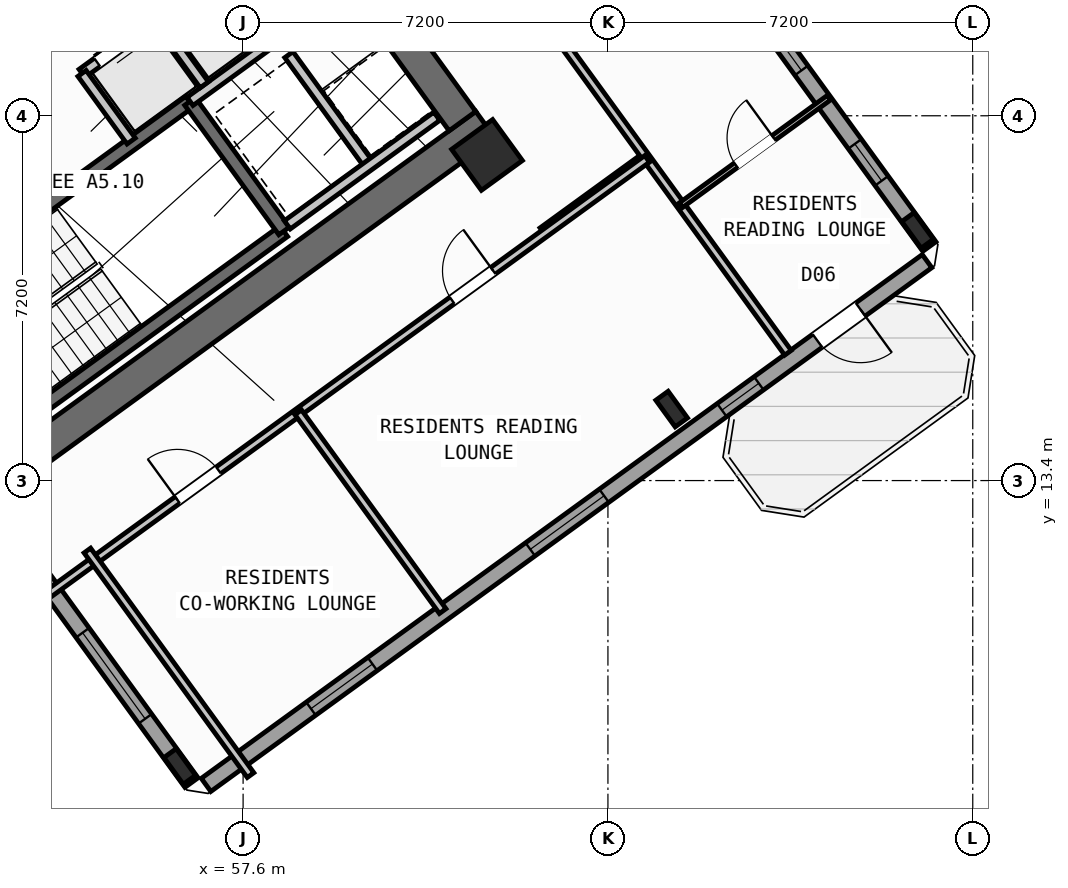
"""IFC4 building model, lengths in metres.
Left out: names, types, materials, properties, quantities, classifications, styles, units other than length and angle.
Written with IfcOpenShell. Run it as: python <this file> out.ifc"""

import sys

from ifc_helpers import new_model, si_unit, direction, frame, frame_2d, origin, origin_2d, place, context, subcontext, project, spatial, rectangle, hollow_rectangle, i_section, extrude, source, transform, mapped, element, fill, save


model = new_model("IFC4")
c1 = context("Model", 3, precision=1e-05, world=origin(), true_north=direction((0.0, 1.0)))
c2 = subcontext(c1, "Body", "Model", "MODEL_VIEW")
j1 = project(units=[si_unit("LENGTHUNIT", "METRE"), si_unit("PLANEANGLEUNIT", "RADIAN")], contexts=[c1])
p1 = place(None, origin())
s1 = spatial("IfcSite", under=j1, at=p1, CompositionType="ELEMENT")
p2 = place(p1, origin())
s2 = spatial("IfcBuilding", under=s1, at=p2, CompositionType="ELEMENT")
p3 = place(p2, frame((0.0, 0.0, 56.4)))
s3 = spatial("IfcBuildingStorey", under=s2, at=p3, CompositionType="ELEMENT", Elevation=56.4)
p4 = place(p3, frame((52.318, 13.11, 0.0), z_axis=(0.0, 0.0, 1.0), x_axis=(0.809019445368, 0.587781878776, 0.0)))
e1 = element("IfcWall", 1, at=p4, inside=s3, PredefinedType="SHEAR", context=c2, shape_type="SweptSolid", body=[
    extrude(rectangle(XDim=12.44, YDim=0.65, at=frame_2d((6.22, 0.0))), origin(), (0.0, 0.0, 1.0), 3.35),
])
p5 = place(p3, frame((61.929, 20.494, 0.0), z_axis=(0.0, 0.0, 1.0), x_axis=(-0.58782982593, 0.808984607855, 0.0)))
e2 = element("IfcWall", 2, at=p5, inside=s3, PredefinedType="SHEAR", context=c2, shape_type="SweptSolid", body=[
    extrude(rectangle(XDim=3.525, YDim=0.65, at=frame_2d((1.762, 0.0))), origin(), (0.0, 0.0, 1.0), 3.35),
])
m1 = source(origin(), c2, "Body", "SweptSolid", [
    extrude(i_section(OverallWidth=0.3, OverallDepth=0.65, WebThickness=0.016, FlangeThickness=0.031, at=origin_2d()), origin(), (0.0, 0.0, 1.0), 3.6),
])
for number, where, z_axis, x_axis in (
    (3, (56.35, 7.758, 0.0), (0.0, 0.0, 1.0), (0.809, 0.588, 0.0)),
    (4, (66.058, 14.811, 0.0), (0.0, 0.0, 1.0), (0.809, 0.588, 0.0)),
):
    element("IfcColumn", number, at=place(p3, frame(where, z_axis=z_axis, x_axis=x_axis)), inside=s3, PredefinedType="COLUMN", context=c2, shape_type="MappedRepresentation", body=[
        mapped(m1, transform((0.0, 0.0, 0.0), scale=1.0)),
    ])
m2 = source(origin(), c2, "Body", "SweptSolid", [
    extrude(hollow_rectangle(XDim=1.0, YDim=1.0, WallThickness=0.04, at=origin_2d()), origin(), (0.0, 0.0, 1.0), 3.6),
])
p6 = place(p3, frame((62.414, 19.827, 0.0), z_axis=(0.0, 0.0, 1.0), x_axis=(0.809016994375, 0.587785252292, 0.0)))
e5 = element("IfcColumn", 5, at=p6, inside=s3, PredefinedType="COLUMN", context=c2, shape_type="MappedRepresentation", body=[
    mapped(m2, transform((0.0, 0.0, 0.0), scale=1.0)),
])
p7 = place(p3, frame((70.912, 18.338, 0.0), z_axis=(0.0, 0.0, 1.0), x_axis=(0.809016994375, 0.587785252292, 0.0)))
e6 = element("IfcColumn", 6, at=p7, inside=s3, PredefinedType="COLUMN", context=c2, shape_type="MappedRepresentation", body=[
    mapped(m1, transform((0.0, 0.0, 0.0), scale=1.0)),
])
p8 = place(p3, frame((58.455, 35.484, 0.0), z_axis=(0.0, 0.0, 1.0), x_axis=(0.587783625747, -0.809018176127, 0.0)))
e7 = element("IfcWall", 7, at=p8, inside=s3, PredefinedType="STANDARD", context=c2, shape_type="SweptSolid", body=[
    extrude(rectangle(XDim=21.587, YDim=0.32, at=frame_2d((10.794, 0.0))), origin(), (0.0, 0.0, 1.0), 2.725),
])
p9 = place(p8, frame((1.54, 0.0, 0.85)))
e8 = element("IfcOpeningElement", 8, at=p9, cuts=e7, PredefinedType="OPENING", context=c2, shape_type="SweptSolid", body=[
    extrude(rectangle(XDim=1.5, YDim=1.5, at=frame_2d((0.75, 0.75))), frame((0.0, 0.17, 0.0), z_axis=(0.0, -1.0, 0.0), x_axis=(1.0, 0.0, 0.0)), (0.0, 0.0, 1.0), 0.34),
])
p10 = place(p8, frame((4.695, 0.0, 0.85)))
e9 = element("IfcOpeningElement", 9, at=p10, cuts=e7, PredefinedType="OPENING", context=c2, shape_type="SweptSolid", body=[
    extrude(rectangle(XDim=1.8, YDim=1.5, at=frame_2d((0.9, 0.75))), frame((0.0, 0.17, 0.0), z_axis=(0.0, -1.0, 0.0), x_axis=(1.0, 0.0, 0.0)), (0.0, 0.0, 1.0), 0.34),
])
p11 = place(p8, frame((13.009, 0.0, 1.0)))
e10 = element("IfcOpeningElement", 10, at=p11, cuts=e7, PredefinedType="OPENING", context=c2, shape_type="SweptSolid", body=[
    extrude(rectangle(XDim=0.9, YDim=1.25, at=frame_2d((0.45, 0.625))), frame((0.0, 0.17, 0.0), z_axis=(0.0, -1.0, 0.0), x_axis=(1.0, 0.0, 0.0)), (0.0, 0.0, 1.0), 0.34),
])
p12 = place(p8, frame((16.092, 0.0, 0.95)))
e11 = element("IfcOpeningElement", 11, at=p12, cuts=e7, PredefinedType="OPENING", context=c2, shape_type="SweptSolid", body=[
    extrude(rectangle(XDim=1.2, YDim=1.4, at=frame_2d((0.6, 0.7))), frame((0.0, 0.17, 0.0), z_axis=(0.0, -1.0, 0.0), x_axis=(1.0, 0.0, 0.0)), (0.0, 0.0, 1.0), 0.34),
])
p13 = place(p8, frame((19.085, 0.0, 1.0)))
e12 = element("IfcOpeningElement", 12, at=p13, cuts=e7, PredefinedType="OPENING", context=c2, shape_type="SweptSolid", body=[
    extrude(rectangle(XDim=0.9, YDim=1.25, at=frame_2d((0.45, 0.625))), frame((0.0, 0.17, 0.0), z_axis=(0.0, -1.0, 0.0), x_axis=(1.0, 0.0, 0.0)), (0.0, 0.0, 1.0), 0.34),
])
p14 = place(p3, frame((71.098, 17.731, 0.0), z_axis=(0.0, 0.0, 1.0), x_axis=(-0.809021120468, -0.587779573171, 0.0)))
e13 = element("IfcWall", 13, at=p14, inside=s3, PredefinedType="STANDARD", context=c2, shape_type="SweptSolid", body=[
    extrude(rectangle(XDim=17.588, YDim=0.32, at=frame_2d((8.794, 0.0))), origin(), (0.0, 0.0, 1.0), 3.35),
])
p15 = place(p14, frame((1.624, 0.0, 0.0)))
e14 = element("IfcOpeningElement", 14, at=p15, cuts=e13, PredefinedType="OPENING", context=c2, shape_type="SweptSolid", body=[
    extrude(rectangle(XDim=1.05, YDim=2.15, at=frame_2d((0.525, 1.075))), frame((0.0, 0.17, 0.0), z_axis=(0.0, -1.0, 0.0), x_axis=(1.0, 0.0, 0.0)), (0.0, 0.0, 1.0), 0.34),
])
p16 = place(p14, frame((4.104, 0.0, 1.0)))
e15 = element("IfcOpeningElement", 15, at=p16, cuts=e13, PredefinedType="OPENING", context=c2, shape_type="SweptSolid", body=[
    extrude(rectangle(XDim=0.9, YDim=1.25, at=frame_2d((0.45, 0.625))), frame((0.0, 0.17, 0.0), z_axis=(0.0, -1.0, 0.0), x_axis=(1.0, 0.0, 0.0)), (0.0, 0.0, 1.0), 0.34),
])
p17 = place(p14, frame((7.879, 0.0, 0.85)))
e16 = element("IfcOpeningElement", 16, at=p17, cuts=e13, PredefinedType="OPENING", context=c2, shape_type="SweptSolid", body=[
    extrude(rectangle(XDim=1.8, YDim=1.5, at=frame_2d((0.9, 0.75))), frame((0.0, 0.17, 0.0), z_axis=(0.0, -1.0, 0.0), x_axis=(1.0, 0.0, 0.0)), (0.0, 0.0, 1.0), 0.34),
])
p18 = place(p14, frame((13.529, 0.0, 0.85)))
e17 = element("IfcOpeningElement", 17, at=p18, cuts=e13, PredefinedType="OPENING", context=c2, shape_type="SweptSolid", body=[
    extrude(rectangle(XDim=1.5, YDim=1.5, at=frame_2d((0.75, 0.75))), frame((0.0, 0.17, 0.0), z_axis=(0.0, -1.0, 0.0), x_axis=(1.0, 0.0, 0.0)), (0.0, 0.0, 1.0), 0.34),
])
p19 = place(p3, frame((56.581, 7.439, 0.0), z_axis=(0.0, 0.0, 1.0), x_axis=(-0.587785875463, 0.809016541614, 0.0)))
e18 = element("IfcWall", 18, at=p19, inside=s3, PredefinedType="STANDARD", context=c2, shape_type="SweptSolid", body=[
    extrude(rectangle(XDim=6.774, YDim=0.32, at=frame_2d((3.387, 0.0))), origin(), (0.0, 0.0, 1.0), 2.725),
])
p20 = place(p19, frame((1.556, 0.0, 0.8)))
e19 = element("IfcOpeningElement", 19, at=p20, cuts=e18, PredefinedType="OPENING", context=c2, shape_type="SweptSolid", body=[
    extrude(rectangle(XDim=2.1, YDim=1.55, at=frame_2d((1.05, 0.775))), frame((0.0, 0.17, 0.0), z_axis=(0.0, -1.0, 0.0), x_axis=(1.0, 0.0, 0.0)), (0.0, 0.0, 1.0), 0.34),
])
p21 = place(p3, frame((52.472, 14.013, 0.0), z_axis=(0.0, 0.0, 1.0), x_axis=(0.809028366311, 0.587769599847, 0.0)))
e20 = element("IfcWall", 20, at=p21, inside=s3, PredefinedType="SHEAR", context=c2, shape_type="SweptSolid", body=[
    extrude(rectangle(XDim=7.33, YDim=0.26, at=frame_2d((3.665, 0.0))), origin(), (0.0, 0.0, 1.0), 3.35),
])
p22 = place(p3, frame((50.615, 16.57, 0.0), z_axis=(0.0, 0.0, 1.0), x_axis=(0.809028366311, 0.587769599847, 0.0)))
e21 = element("IfcWall", 21, at=p22, inside=s3, PredefinedType="SHEAR", context=c2, shape_type="SweptSolid", body=[
    extrude(rectangle(XDim=7.33, YDim=0.26, at=frame_2d((3.665, 0.0))), origin(), (0.0, 0.0, 1.0), 3.35),
])
p23 = place(p22, frame((0.22, 0.0, 0.0)))
e22 = element("IfcOpeningElement", 22, at=p23, cuts=e21, PredefinedType="OPENING", context=c2, shape_type="SweptSolid", body=[
    extrude(rectangle(XDim=1.1, YDim=2.1, at=frame_2d((0.55, 1.05))), frame((0.0, 0.14, 0.0), z_axis=(0.0, -1.0, 0.0), x_axis=(1.0, 0.0, 0.0)), (0.0, 0.0, 1.0), 0.28),
])
p24 = place(p3, frame((58.41, 18.327, 0.0), z_axis=(0.0, 0.0, 1.0), x_axis=(-0.58776738483, 0.809029975545, 0.0)))
e23 = element("IfcWall", 23, at=p24, inside=s3, PredefinedType="SHEAR", context=c2, shape_type="SweptSolid", body=[
    extrude(rectangle(XDim=3.16, YDim=0.26, at=frame_2d((1.58, 0.0))), origin(), (0.0, 0.0, 1.0), 3.35),
])
p25 = place(p3, frame((56.553, 20.884, 0.0), z_axis=(0.0, 0.0, 1.0), x_axis=(0.809035789462, 0.587759382205, 0.0)))
e24 = element("IfcWall", 24, at=p25, inside=s3, PredefinedType="STANDARD", context=c2, shape_type="SweptSolid", body=[
    extrude(rectangle(XDim=3.768, YDim=0.2, at=frame_2d((1.884, 0.0))), origin(), (0.0, 0.0, 1.0), 3.34),
])
p26 = place(p25, frame((2.65, 0.0, 0.0)))
e25 = element("IfcOpeningElement", 25, at=p26, cuts=e24, PredefinedType="OPENING", context=c2, shape_type="SweptSolid", body=[
    extrude(rectangle(XDim=0.86, YDim=2.05, at=frame_2d((0.43, 1.025))), frame((0.0, 0.11, 0.0), z_axis=(0.0, -1.0, 0.0), x_axis=(1.0, 0.0, 0.0)), (0.0, 0.0, 1.0), 0.22),
])
p27 = place(p3, frame((54.421, 21.436, 0.0), z_axis=(0.0, 0.0, 1.0), x_axis=(0.809013710463, 0.587789772183, 0.0)))
e26 = element("IfcWall", 26, at=p27, inside=s3, PredefinedType="STANDARD", context=c2, shape_type="SweptSolid", body=[
    extrude(rectangle(XDim=5.36, YDim=0.2, at=frame_2d((2.68, 0.0))), origin(), (0.0, 0.0, 1.0), 3.34),
])
p28 = place(p27, frame((0.37, 0.0, 0.0)))
e27 = element("IfcOpeningElement", 27, at=p28, cuts=e26, PredefinedType="OPENING", context=c2, shape_type="SweptSolid", body=[
    extrude(rectangle(XDim=1.1, YDim=2.15, at=frame_2d((0.55, 1.075))), frame((0.0, 0.11, 0.0), z_axis=(0.0, -1.0, 0.0), x_axis=(1.0, 0.0, 0.0)), (0.0, 0.0, 1.0), 0.22),
])
p29 = place(p27, frame((2.17, 0.0, 0.0)))
e28 = element("IfcOpeningElement", 28, at=p29, cuts=e26, PredefinedType="OPENING", context=c2, shape_type="SweptSolid", body=[
    extrude(rectangle(XDim=1.1, YDim=2.15, at=frame_2d((0.55, 1.075))), frame((0.0, 0.11, 0.0), z_axis=(0.0, -1.0, 0.0), x_axis=(1.0, 0.0, 0.0)), (0.0, 0.0, 1.0), 0.22),
])
p30 = place(p27, frame((3.97, 0.0, 0.0)))
e29 = element("IfcOpeningElement", 29, at=p30, cuts=e26, PredefinedType="OPENING", context=c2, shape_type="SweptSolid", body=[
    extrude(rectangle(XDim=1.1, YDim=2.15, at=frame_2d((0.55, 1.075))), frame((0.0, 0.11, 0.0), z_axis=(0.0, -1.0, 0.0), x_axis=(1.0, 0.0, 0.0)), (0.0, 0.0, 1.0), 0.22),
])
p31 = place(p3, frame((55.391, 20.102, 0.0), z_axis=(0.0, 0.0, 1.0), x_axis=(-0.58778447739, 0.809017557374, 0.0)))
e30 = element("IfcWall", 30, at=p31, inside=s3, PredefinedType="STANDARD", context=c2, shape_type="SweptSolid", body=[
    extrude(rectangle(XDim=1.65, YDim=0.2, at=frame_2d((0.825, 0.0))), origin(), (0.0, 0.0, 1.0), 3.34),
])
p32 = place(p3, frame((56.834, 21.212, 0.0), z_axis=(0.0, 0.0, 1.0), x_axis=(-0.58776738483, 0.809029975545, 0.0)))
e31 = element("IfcWall", 31, at=p32, inside=s3, PredefinedType="STANDARD", context=c2, shape_type="SweptSolid", body=[
    extrude(rectangle(XDim=1.58, YDim=0.2, at=frame_2d((0.79, 0.0))), origin(), (0.0, 0.0, 1.0), 3.34),
])
p33 = place(p3, frame((60.067, 19.655, 0.0), z_axis=(0.0, 0.0, 1.0), x_axis=(-0.587800520745, 0.809005900975, 0.0)))
e32 = element("IfcWall", 32, at=p33, inside=s3, PredefinedType="STANDARD", context=c2, shape_type="SweptSolid", body=[
    extrude(rectangle(XDim=2.66, YDim=0.2, at=frame_2d((1.33, 0.0))), origin(), (0.0, 0.0, 1.0), 3.34),
])
p34 = place(p3, frame((58.472, 18.447, 0.0), z_axis=(0.0, 0.0, 1.0), x_axis=(0.809022487728, 0.587777691266, 0.0)))
e33 = element("IfcWall", 33, at=p34, inside=s3, PredefinedType="STANDARD", context=c2, shape_type="SweptSolid", body=[
    extrude(rectangle(XDim=3.648, YDim=0.2, at=frame_2d((1.824, 0.0))), origin(), (0.0, 0.0, 1.0), 3.34),
])
p35 = place(p3, frame((63.507, 18.322, 0.0), z_axis=(0.0, 0.0, 1.0), x_axis=(0.809034604122, 0.587761013791, 0.0)))
e34 = element("IfcWall", 34, at=p35, inside=s3, PredefinedType="PARTITIONING", context=c2, shape_type="SweptSolid", body=[
    extrude(rectangle(XDim=2.51, YDim=0.16, at=frame_2d((1.255, 0.0))), origin(), (0.0, 0.0, 1.0), 3.34),
])
p36 = place(p3, frame((68.353, 15.922, 0.0), z_axis=(0.0, 0.0, 1.0), x_axis=(-0.587784007866, 0.809017898502, 0.0)))
e35 = element("IfcWall", 35, at=p36, inside=s3, PredefinedType="PARTITIONING", context=c2, shape_type="SweptSolid", body=[
    extrude(rectangle(XDim=9.4, YDim=0.16, at=frame_2d((4.7, 0.0))), origin(), (0.0, 0.0, 1.0), 3.34),
])
p37 = place(p3, frame((66.238, 18.833, 0.0), z_axis=(0.0, 0.0, 1.0), x_axis=(0.809013833588, 0.587789602718, 0.0)))
e36 = element("IfcWall", 36, at=p37, inside=s3, PredefinedType="PARTITIONING", context=c2, shape_type="SweptSolid", body=[
    extrude(rectangle(XDim=3.61, YDim=0.11, at=frame_2d((1.805, 0.0))), origin(), (0.0, 0.0, 1.0), 3.34),
])
p38 = place(p37, frame((1.345, 0.0, 0.0)))
e37 = element("IfcOpeningElement", 37, at=p38, cuts=e36, PredefinedType="OPENING", context=c2, shape_type="SweptSolid", body=[
    extrude(rectangle(XDim=0.92, YDim=2.08, at=frame_2d((0.46, 1.04))), frame((0.0, 0.065, 0.0), z_axis=(0.0, -1.0, 0.0), x_axis=(1.0, 0.0, 0.0)), (0.0, 0.0, 1.0), 0.13),
])
p39 = place(p3, frame((53.705, 11.126, 0.0), z_axis=(0.0, 0.0, 1.0), x_axis=(0.809014504436, 0.587788679384, 0.0)))
e38 = element("IfcWall", 38, at=p39, inside=s3, PredefinedType="PARTITIONING", context=c2, shape_type="SweptSolid", body=[
    extrude(rectangle(XDim=14.67, YDim=0.16, at=frame_2d((7.335, 0.0))), origin(), (0.0, 0.0, 1.0), 3.34),
])
p40 = place(p39, frame((3.215, 0.0, 0.0)))
e39 = element("IfcOpeningElement", 39, at=p40, cuts=e38, PredefinedType="OPENING", context=c2, shape_type="SweptSolid", body=[
    extrude(rectangle(XDim=1.0, YDim=2.1, at=frame_2d((0.5, 1.05))), frame((0.0, 0.09, 0.0), z_axis=(0.0, -1.0, 0.0), x_axis=(1.0, 0.0, 0.0)), (0.0, 0.0, 1.0), 0.18),
])
p41 = place(p39, frame((9.915, 0.0, 0.0)))
e40 = element("IfcOpeningElement", 40, at=p41, cuts=e38, PredefinedType="OPENING", context=c2, shape_type="SweptSolid", body=[
    extrude(rectangle(XDim=1.0, YDim=2.1, at=frame_2d((0.5, 1.05))), frame((0.0, 0.09, 0.0), z_axis=(0.0, -1.0, 0.0), x_axis=(1.0, 0.0, 0.0)), (0.0, 0.0, 1.0), 0.18),
])
p42 = place(p3, frame((57.747, 7.586, 0.0), z_axis=(0.0, 0.0, 1.0), x_axis=(-0.587784893399, 0.809017255126, 0.0)))
e41 = element("IfcWall", 41, at=p42, inside=s3, PredefinedType="PARTITIONING", context=c2, shape_type="SweptSolid", body=[
    extrude(rectangle(XDim=5.48, YDim=0.16, at=frame_2d((2.74, 0.0))), origin(), (0.0, 0.0, 1.0), 3.34),
])
p43 = place(p3, frame((61.539, 10.823, 0.0), z_axis=(0.0, 0.0, 1.0), x_axis=(-0.587785532001, 0.809016791155, 0.0)))
e42 = element("IfcWall", 42, at=p43, inside=s3, PredefinedType="PARTITIONING", context=c2, shape_type="SweptSolid", body=[
    extrude(rectangle(XDim=4.85, YDim=0.16, at=frame_2d((2.425, 0.0))), origin(), (0.0, 0.0, 1.0), 3.34),
])
m3 = source(origin(), c2, "Body", "SweptSolid", [
    extrude(rectangle(XDim=1.05, YDim=2.15, at=frame_2d((0.525, 1.075))), frame((0.0, 0.025, 0.0), z_axis=(0.0, -1.0, 0.0), x_axis=(1.0, 0.0, 0.0)), (0.0, 0.0, 1.0), 0.05),
])
p44 = place(p15, origin())
e43 = element("IfcDoor", 43, at=p44, inside=s3, OperationType="SINGLE_SWING_LEFT", PredefinedType="DOOR", context=c2, shape_type="MappedRepresentation", body=[
    mapped(m3, transform((0.0, 0.0, 0.0), scale=1.0)),
])
fill(e14, e43)
m4 = source(origin(), c2, "Body", "SweptSolid", [
    extrude(rectangle(XDim=1.2, YDim=1.4, at=frame_2d((0.6, 0.7))), frame((0.0, 0.03, 0.0), z_axis=(0.0, -1.0, 0.0), x_axis=(1.0, 0.0, 0.0)), (0.0, 0.0, 1.0), 0.06),
])
p45 = place(p12, origin())
e44 = element("IfcWindow", 44, at=p45, inside=s3, PartitioningType="SINGLE_PANEL", PredefinedType="WINDOW", context=c2, shape_type="MappedRepresentation", body=[
    mapped(m4, transform((0.0, 0.0, 0.0), scale=1.0)),
])
fill(e11, e44)
m5 = source(origin(), c2, "Body", "SweptSolid", [
    extrude(rectangle(XDim=0.9, YDim=1.25, at=frame_2d((0.45, 0.625))), frame((0.0, 0.03, 0.0), z_axis=(0.0, -1.0, 0.0), x_axis=(1.0, 0.0, 0.0)), (0.0, 0.0, 1.0), 0.06),
])
p46 = place(p13, origin())
e45 = element("IfcWindow", 45, at=p46, inside=s3, PartitioningType="SINGLE_PANEL", PredefinedType="WINDOW", context=c2, shape_type="MappedRepresentation", body=[
    mapped(m5, transform((0.0, 0.0, 0.0), scale=1.0)),
])
fill(e12, e45)
p47 = place(p16, origin())
e46 = element("IfcWindow", 46, at=p47, inside=s3, PartitioningType="SINGLE_PANEL", PredefinedType="WINDOW", context=c2, shape_type="MappedRepresentation", body=[
    mapped(m5, transform((0.0, 0.0, 0.0), scale=1.0)),
])
fill(e15, e46)
m6 = source(origin(), c2, "Body", "SweptSolid", [
    extrude(rectangle(XDim=1.8, YDim=1.5, at=frame_2d((0.9, 0.75))), frame((0.0, 0.03, 0.0), z_axis=(0.0, -1.0, 0.0), x_axis=(1.0, 0.0, 0.0)), (0.0, 0.0, 1.0), 0.06),
])
p48 = place(p17, origin())
e47 = element("IfcWindow", 47, at=p48, inside=s3, PartitioningType="SINGLE_PANEL", PredefinedType="WINDOW", context=c2, shape_type="MappedRepresentation", body=[
    mapped(m6, transform((0.0, 0.0, 0.0), scale=1.0)),
])
fill(e16, e47)
m7 = source(origin(), c2, "Body", "SweptSolid", [
    extrude(rectangle(XDim=1.5, YDim=1.5, at=frame_2d((0.75, 0.75))), frame((0.0, 0.03, 0.0), z_axis=(0.0, -1.0, 0.0), x_axis=(1.0, 0.0, 0.0)), (0.0, 0.0, 1.0), 0.06),
])
p49 = place(p18, origin())
e48 = element("IfcWindow", 48, at=p49, inside=s3, PartitioningType="SINGLE_PANEL", PredefinedType="WINDOW", context=c2, shape_type="MappedRepresentation", body=[
    mapped(m7, transform((0.0, 0.0, 0.0), scale=1.0)),
])
fill(e17, e48)
m8 = source(origin(), c2, "Body", "SweptSolid", [
    extrude(rectangle(XDim=2.1, YDim=1.55, at=frame_2d((1.05, 0.775))), frame((0.0, 0.03, 0.0), z_axis=(0.0, -1.0, 0.0), x_axis=(1.0, 0.0, 0.0)), (0.0, 0.0, 1.0), 0.06),
])
p50 = place(p20, origin())
e49 = element("IfcWindow", 49, at=p50, inside=s3, PartitioningType="SINGLE_PANEL", PredefinedType="WINDOW", context=c2, shape_type="MappedRepresentation", body=[
    mapped(m8, transform((0.0, 0.0, 0.0), scale=1.0)),
])
fill(e19, e49)
m9 = source(origin(), c2, "Body", "SweptSolid", [
    extrude(rectangle(XDim=1.1, YDim=2.15, at=frame_2d((0.55, 1.075))), frame((0.0, 0.025, 0.0), z_axis=(0.0, -1.0, 0.0), x_axis=(1.0, 0.0, 0.0)), (0.0, 0.0, 1.0), 0.05),
])
p51 = place(p28, origin())
e50 = element("IfcDoor", 50, at=p51, inside=s3, OperationType="DOUBLE_DOOR_SLIDING", PredefinedType="DOOR", context=c2, shape_type="MappedRepresentation", body=[
    mapped(m9, transform((0.0, 0.0, 0.0), scale=1.0)),
])
fill(e27, e50)
m10 = source(origin(), c2, "Body", "SweptSolid", [
    extrude(rectangle(XDim=0.92, YDim=2.08, at=frame_2d((0.46, 1.04))), frame((0.0, 0.025, 0.0), z_axis=(0.0, -1.0, 0.0), x_axis=(1.0, 0.0, 0.0)), (0.0, 0.0, 1.0), 0.05),
])
p52 = place(p38, origin())
e51 = element("IfcDoor", 51, at=p52, inside=s3, OperationType="SINGLE_SWING_RIGHT", PredefinedType="DOOR", context=c2, shape_type="MappedRepresentation", body=[
    mapped(m10, transform((0.0, 0.0, 0.0), scale=1.0)),
])
fill(e37, e51)
m11 = source(origin(), c2, "Body", "SweptSolid", [
    extrude(rectangle(XDim=1.0, YDim=2.1, at=frame_2d((0.5, 1.05))), frame((0.0, 0.025, 0.0), z_axis=(0.0, -1.0, 0.0), x_axis=(1.0, 0.0, 0.0)), (0.0, 0.0, 1.0), 0.05),
])
p53 = place(p40, origin())
e52 = element("IfcDoor", 52, at=p53, inside=s3, OperationType="SINGLE_SWING_LEFT", PredefinedType="DOOR", context=c2, shape_type="MappedRepresentation", body=[
    mapped(m11, transform((0.0, 0.0, 0.0), scale=1.0)),
])
fill(e39, e52)
p54 = place(p41, origin())
e53 = element("IfcDoor", 53, at=p54, inside=s3, OperationType="SINGLE_SWING_RIGHT", PredefinedType="DOOR", context=c2, shape_type="MappedRepresentation", body=[
    mapped(m11, transform((0.0, 0.0, 0.0), scale=1.0)),
])
fill(e40, e53)
save(model, sys.argv[1])
